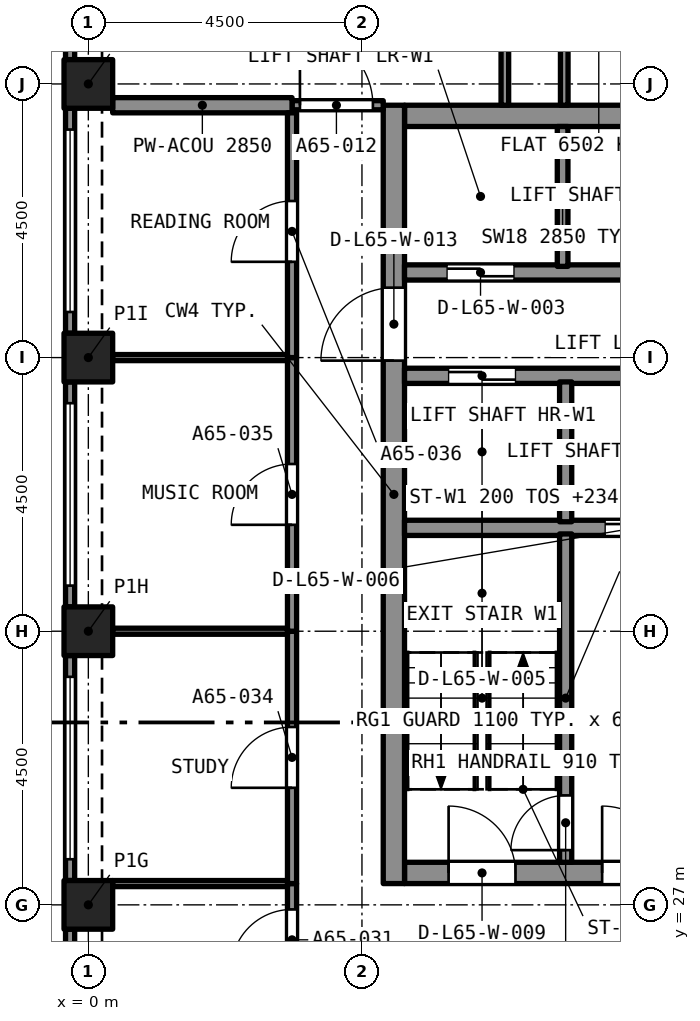
"""IFC4 building model, lengths in metres.
Left out: names, types, materials, properties, quantities, classifications, styles, units other than length and angle.
Written with IfcOpenShell. Run it as: python <this file> out.ifc"""

import sys

from ifc_helpers import new_model, si_unit, direction, frame, frame_2d, origin, origin_2d, place, context, subcontext, project, spatial, rectangle, extrude, element, fill, save


model = new_model("IFC4")
c1 = context("Model", 3, precision=1e-05, world=origin(), true_north=direction((0.0, 1.0)))
c2 = subcontext(c1, "Body", "Model", "MODEL_VIEW")
j1 = project(units=[si_unit("LENGTHUNIT", "METRE"), si_unit("PLANEANGLEUNIT", "RADIAN")], contexts=[c1])
p1 = place(None, origin())
s1 = spatial("IfcSite", under=j1, at=p1, CompositionType="ELEMENT")
p2 = place(p1, origin())
s2 = spatial("IfcBuilding", under=s1, at=p2, CompositionType="ELEMENT")
p3 = place(p2, frame((0.0, 0.0, 232.495)))
s3 = spatial("IfcBuildingStorey", under=s2, at=p3, CompositionType="ELEMENT", Elevation=232.495)
for number, where, z_axis, x_axis in (
    (1, (0.0, 27.0, 0.0), (0.0, 0.0, 1.0), (1.0, 0.0, 0.0)),
    (2, (0.0, 31.5, 0.0), (0.0, 0.0, 1.0), (1.0, 0.0, 0.0)),
    (3, (0.0, 36.0, 0.0), (0.0, 0.0, 1.0), (1.0, 0.0, 0.0)),
    (4, (0.0, 40.5, 0.0), (0.0, 0.0, 1.0), (1.0, 0.0, 0.0)),
):
    element("IfcColumn", number, at=place(p3, frame(where, z_axis=z_axis, x_axis=x_axis)), inside=s3, PredefinedType="COLUMN", context=c2, shape_type="SweptSolid", body=[
        extrude(rectangle(XDim=0.8, YDim=0.8, at=origin_2d()), origin(), (0.0, 0.0, 1.0), 3.2),
    ])
p4 = place(p3, frame((5.2, 27.525, 0.0), z_axis=(0.0, 0.0, 1.0), x_axis=(1.0, 0.0, 0.0)))
e5 = element("IfcWall", 5, at=p4, inside=s3, PredefinedType="SOLIDWALL", context=c2, shape_type="SweptSolid", body=[
    extrude(rectangle(XDim=7.6, YDim=0.35, at=frame_2d((3.8, 0.0))), origin(), (0.0, 0.0, 1.0), 3.2),
])
p5 = place(p4, frame((0.725, 0.0, 0.0)))
e6 = element("IfcOpeningElement", 6, at=p5, cuts=e5, PredefinedType="OPENING", context=c2, shape_type="SweptSolid", body=[
    extrude(rectangle(XDim=1.1, YDim=2.1, at=frame_2d((0.55, 1.05))), frame((0.0, 0.185, 0.0), z_axis=(0.0, -1.0, 0.0), x_axis=(1.0, 0.0, 0.0)), (0.0, 0.0, 1.0), 0.37),
])
p6 = place(p4, frame((3.25, 0.0, 0.0)))
e7 = element("IfcOpeningElement", 7, at=p6, cuts=e5, PredefinedType="OPENING", context=c2, shape_type="SweptSolid", body=[
    extrude(rectangle(XDim=1.1, YDim=2.1, at=frame_2d((0.55, 1.05))), frame((0.0, 0.185, 0.0), z_axis=(0.0, -1.0, 0.0), x_axis=(1.0, 0.0, 0.0)), (0.0, 0.0, 1.0), 0.37),
])
p7 = place(p4, frame((5.775, 0.0, 0.0)))
e8 = element("IfcOpeningElement", 8, at=p7, cuts=e5, PredefinedType="OPENING", context=c2, shape_type="SweptSolid", body=[
    extrude(rectangle(XDim=1.1, YDim=2.1, at=frame_2d((0.55, 1.05))), frame((0.0, 0.185, 0.0), z_axis=(0.0, -1.0, 0.0), x_axis=(1.0, 0.0, 0.0)), (0.0, 0.0, 1.0), 0.37),
])
p8 = place(p3, frame((5.2, 39.975, 0.0), z_axis=(0.0, 0.0, 1.0), x_axis=(1.0, 0.0, 0.0)))
e9 = element("IfcWall", 9, at=p8, inside=s3, PredefinedType="SOLIDWALL", context=c2, shape_type="SweptSolid", body=[
    extrude(rectangle(XDim=7.6, YDim=0.35, at=frame_2d((3.8, 0.0))), origin(), (0.0, 0.0, 1.0), 3.2),
])
p9 = place(p3, frame((5.025, 27.35, 0.0), z_axis=(0.0, 0.0, 1.0), x_axis=(0.0, 1.0, 0.0)))
e10 = element("IfcWall", 10, at=p9, inside=s3, PredefinedType="SOLIDWALL", context=c2, shape_type="SweptSolid", body=[
    extrude(rectangle(XDim=12.8, YDim=0.35, at=frame_2d((6.4, 0.0))), origin(), (0.0, 0.0, 1.0), 3.2),
])
p10 = place(p9, frame((8.6, 0.0, 0.0)))
e11 = element("IfcOpeningElement", 11, at=p10, cuts=e10, PredefinedType="OPENING", context=c2, shape_type="SweptSolid", body=[
    extrude(rectangle(XDim=1.2, YDim=2.1, at=frame_2d((0.6, 1.05))), frame((0.0, 0.185, 0.0), z_axis=(0.0, -1.0, 0.0), x_axis=(1.0, 0.0, 0.0)), (0.0, 0.0, 1.0), 0.37),
])
p11 = place(p3, frame((-0.3, 40.9, 0.0), z_axis=(0.0, 0.0, 1.0), x_axis=(0.0, 1.0, 0.0)))
e12 = element("IfcWall", 12, at=p11, inside=s3, PredefinedType="SOLIDWALL", context=c2, shape_type="SweptSolid", body=[
    extrude(rectangle(XDim=3.7, YDim=0.15, at=frame_2d((1.85, 0.0))), origin(), (0.0, 0.0, 1.0), 3.2),
])
p12 = place(p11, frame((0.35, 0.0, 0.45)))
e13 = element("IfcOpeningElement", 13, at=p12, cuts=e12, PredefinedType="OPENING", context=c2, shape_type="SweptSolid", body=[
    extrude(rectangle(XDim=3.0, YDim=1.95, at=frame_2d((1.5, 0.975))), frame((0.0, 0.085, 0.0), z_axis=(0.0, -1.0, 0.0), x_axis=(1.0, 0.0, 0.0)), (0.0, 0.0, 1.0), 0.17),
])
p13 = place(p3, frame((-0.3, 36.4, 0.0), z_axis=(0.0, 0.0, 1.0), x_axis=(0.0, 1.0, 0.0)))
e14 = element("IfcWall", 14, at=p13, inside=s3, PredefinedType="SOLIDWALL", context=c2, shape_type="SweptSolid", body=[
    extrude(rectangle(XDim=3.7, YDim=0.15, at=frame_2d((1.85, 0.0))), origin(), (0.0, 0.0, 1.0), 3.2),
])
p14 = place(p13, frame((0.35, 0.0, 0.45)))
e15 = element("IfcOpeningElement", 15, at=p14, cuts=e14, PredefinedType="OPENING", context=c2, shape_type="SweptSolid", body=[
    extrude(rectangle(XDim=3.0, YDim=1.95, at=frame_2d((1.5, 0.975))), frame((0.0, 0.085, 0.0), z_axis=(0.0, -1.0, 0.0), x_axis=(1.0, 0.0, 0.0)), (0.0, 0.0, 1.0), 0.17),
])
p15 = place(p3, frame((-0.3, 31.9, 0.0), z_axis=(0.0, 0.0, 1.0), x_axis=(0.0, 1.0, 0.0)))
e16 = element("IfcWall", 16, at=p15, inside=s3, PredefinedType="SOLIDWALL", context=c2, shape_type="SweptSolid", body=[
    extrude(rectangle(XDim=3.7, YDim=0.15, at=frame_2d((1.85, 0.0))), origin(), (0.0, 0.0, 1.0), 3.2),
])
p16 = place(p15, frame((0.35, 0.0, 0.45)))
e17 = element("IfcOpeningElement", 17, at=p16, cuts=e16, PredefinedType="OPENING", context=c2, shape_type="SweptSolid", body=[
    extrude(rectangle(XDim=3.0, YDim=1.95, at=frame_2d((1.5, 0.975))), frame((0.0, 0.085, 0.0), z_axis=(0.0, -1.0, 0.0), x_axis=(1.0, 0.0, 0.0)), (0.0, 0.0, 1.0), 0.17),
])
p17 = place(p3, frame((-0.3, 27.4, 0.0), z_axis=(0.0, 0.0, 1.0), x_axis=(0.0, 1.0, 0.0)))
e18 = element("IfcWall", 18, at=p17, inside=s3, PredefinedType="SOLIDWALL", context=c2, shape_type="SweptSolid", body=[
    extrude(rectangle(XDim=3.7, YDim=0.15, at=frame_2d((1.85, 0.0))), origin(), (0.0, 0.0, 1.0), 3.2),
])
p18 = place(p17, frame((0.35, 0.0, 0.45)))
e19 = element("IfcOpeningElement", 19, at=p18, cuts=e18, PredefinedType="OPENING", context=c2, shape_type="SweptSolid", body=[
    extrude(rectangle(XDim=3.0, YDim=1.95, at=frame_2d((1.5, 0.975))), frame((0.0, 0.085, 0.0), z_axis=(0.0, -1.0, 0.0), x_axis=(1.0, 0.0, 0.0)), (0.0, 0.0, 1.0), 0.17),
])
p19 = place(p3, frame((-0.3, 22.9, 0.0), z_axis=(0.0, 0.0, 1.0), x_axis=(0.0, 1.0, 0.0)))
e20 = element("IfcWall", 20, at=p19, inside=s3, PredefinedType="SOLIDWALL", context=c2, shape_type="SweptSolid", body=[
    extrude(rectangle(XDim=3.7, YDim=0.15, at=frame_2d((1.85, 0.0))), origin(), (0.0, 0.0, 1.0), 3.2),
])
p20 = place(p19, frame((0.35, 0.0, 0.45)))
e21 = element("IfcOpeningElement", 21, at=p20, cuts=e20, PredefinedType="OPENING", context=c2, shape_type="SweptSolid", body=[
    extrude(rectangle(XDim=3.0, YDim=1.95, at=frame_2d((1.5, 0.975))), frame((0.0, 0.085, 0.0), z_axis=(0.0, -1.0, 0.0), x_axis=(1.0, 0.0, 0.0)), (0.0, 0.0, 1.0), 0.17),
])
p21 = place(p3, frame((6.85, 43.683, 0.0), z_axis=(0.0, 0.0, 1.0), x_axis=(0.0, -1.0, 0.0)))
e22 = element("IfcWall", 22, at=p21, inside=s3, PredefinedType="PARTITIONING", context=c2, shape_type="SweptSolid", body=[
    extrude(rectangle(XDim=3.533, YDim=0.125, at=frame_2d((1.766, 0.0))), origin(), (0.0, 0.0, 1.0), 2.85),
])
p22 = place(p21, frame((0.183, 0.0, 0.0)))
e23 = element("IfcOpeningElement", 23, at=p22, cuts=e22, PredefinedType="OPENING", context=c2, shape_type="SweptSolid", body=[
    extrude(rectangle(XDim=0.8, YDim=2.1, at=frame_2d((0.4, 1.05))), frame((0.0, 0.073, 0.0), z_axis=(0.0, -1.0, 0.0), x_axis=(1.0, 0.0, 0.0)), (0.0, 0.0, 1.0), 0.145),
])
p23 = place(p3, frame((7.827, 40.15, 0.0), z_axis=(0.0, 0.0, 1.0), x_axis=(0.0, 1.0, 0.0)))
e24 = element("IfcWall", 24, at=p23, inside=s3, PredefinedType="PARTITIONING", context=c2, shape_type="SweptSolid", body=[
    extrude(rectangle(XDim=3.408, YDim=0.125, at=frame_2d((1.704, 0.0))), origin(), (0.0, 0.0, 1.0), 2.85),
])
p24 = place(p3, frame((3.35, 40.15, 0.0), z_axis=(0.0, 0.0, 1.0), x_axis=(1.0, 0.0, 0.0)))
e25 = element("IfcWall", 25, at=p24, inside=s3, PredefinedType="PARTITIONING", context=c2, shape_type="SweptSolid", body=[
    extrude(rectangle(XDim=1.5, YDim=0.15, at=frame_2d((0.75, 0.0))), origin(), (0.0, 0.0, 1.0), 2.85),
])
p25 = place(p24, frame((0.13, 0.0, 0.0)))
e26 = element("IfcOpeningElement", 26, at=p25, cuts=e25, PredefinedType="OPENING", context=c2, shape_type="SweptSolid", body=[
    extrude(rectangle(XDim=1.2, YDim=2.4, at=frame_2d((0.6, 1.2))), frame((0.0, 0.085, 0.0), z_axis=(0.0, -1.0, 0.0), x_axis=(1.0, 0.0, 0.0)), (0.0, 0.0, 1.0), 0.17),
])
p26 = place(p3, frame((0.4, 40.15, 0.0), z_axis=(0.0, 0.0, 1.0), x_axis=(1.0, 0.0, 0.0)))
e27 = element("IfcWall", 27, at=p26, inside=s3, PredefinedType="PARTITIONING", context=c2, shape_type="SweptSolid", body=[
    extrude(rectangle(XDim=2.95, YDim=0.25, at=frame_2d((1.475, 0.0))), origin(), (0.0, 0.0, 1.0), 2.85),
])
p27 = place(p3, frame((3.35, 25.425, 0.0), z_axis=(0.0, 0.0, 1.0), x_axis=(0.0, 1.0, 0.0)))
e28 = element("IfcWall", 28, at=p27, inside=s3, PredefinedType="PARTITIONING", context=c2, shape_type="SweptSolid", body=[
    extrude(rectangle(XDim=1.925, YDim=0.15, at=frame_2d((0.962, 0.0))), origin(), (0.0, 0.0, 1.0), 2.85),
])
p28 = place(p27, frame((0.5, 0.0, 0.0)))
e29 = element("IfcOpeningElement", 29, at=p28, cuts=e28, PredefinedType="OPENING", context=c2, shape_type="SweptSolid", body=[
    extrude(rectangle(XDim=1.0, YDim=2.1, at=frame_2d((0.5, 1.05))), frame((0.0, 0.085, 0.0), z_axis=(0.0, -1.0, 0.0), x_axis=(1.0, 0.0, 0.0)), (0.0, 0.0, 1.0), 0.17),
])
p29 = place(p3, frame((3.35, 27.35, 0.0), z_axis=(0.0, 0.0, 1.0), x_axis=(0.0, 1.0, 0.0)))
e30 = element("IfcWall", 30, at=p29, inside=s3, PredefinedType="PARTITIONING", context=c2, shape_type="SweptSolid", body=[
    extrude(rectangle(XDim=4.15, YDim=0.15, at=frame_2d((2.075, 0.0))), origin(), (0.0, 0.0, 1.0), 2.85),
])
p30 = place(p29, frame((1.575, 0.0, 0.0)))
e31 = element("IfcOpeningElement", 31, at=p30, cuts=e30, PredefinedType="OPENING", context=c2, shape_type="SweptSolid", body=[
    extrude(rectangle(XDim=1.0, YDim=2.1, at=frame_2d((0.5, 1.05))), frame((0.0, 0.085, 0.0), z_axis=(0.0, -1.0, 0.0), x_axis=(1.0, 0.0, 0.0)), (0.0, 0.0, 1.0), 0.17),
])
p31 = place(p3, frame((3.35, 31.5, 0.0), z_axis=(0.0, 0.0, 1.0), x_axis=(0.0, 1.0, 0.0)))
e32 = element("IfcWall", 32, at=p31, inside=s3, PredefinedType="PARTITIONING", context=c2, shape_type="SweptSolid", body=[
    extrude(rectangle(XDim=4.5, YDim=0.15, at=frame_2d((2.25, 0.0))), origin(), (0.0, 0.0, 1.0), 2.85),
])
p32 = place(p31, frame((1.75, 0.0, 0.0)))
e33 = element("IfcOpeningElement", 33, at=p32, cuts=e32, PredefinedType="OPENING", context=c2, shape_type="SweptSolid", body=[
    extrude(rectangle(XDim=1.0, YDim=2.1, at=frame_2d((0.5, 1.05))), frame((0.0, 0.085, 0.0), z_axis=(0.0, -1.0, 0.0), x_axis=(1.0, 0.0, 0.0)), (0.0, 0.0, 1.0), 0.17),
])
p33 = place(p3, frame((3.35, 36.0, 0.0), z_axis=(0.0, 0.0, 1.0), x_axis=(0.0, 1.0, 0.0)))
e34 = element("IfcWall", 34, at=p33, inside=s3, PredefinedType="PARTITIONING", context=c2, shape_type="SweptSolid", body=[
    extrude(rectangle(XDim=4.025, YDim=0.15, at=frame_2d((2.012, 0.0))), origin(), (0.0, 0.0, 1.0), 2.85),
])
p34 = place(p33, frame((1.575, 0.0, 0.0)))
e35 = element("IfcOpeningElement", 35, at=p34, cuts=e34, PredefinedType="OPENING", context=c2, shape_type="SweptSolid", body=[
    extrude(rectangle(XDim=1.0, YDim=2.1, at=frame_2d((0.5, 1.05))), frame((0.0, 0.085, 0.0), z_axis=(0.0, -1.0, 0.0), x_axis=(1.0, 0.0, 0.0)), (0.0, 0.0, 1.0), 0.17),
])
for number, where, z_axis, x_axis in (
    (36, (0.4, 27.35, 0.0), (0.0, 0.0, 1.0), (1.0, 0.0, 0.0)),
    (37, (0.4, 31.5, 0.0), (0.0, 0.0, 1.0), (1.0, 0.0, 0.0)),
    (38, (0.4, 36.0, 0.0), (0.0, 0.0, 1.0), (1.0, 0.0, 0.0)),
):
    element("IfcWall", number, at=place(p3, frame(where, z_axis=z_axis, x_axis=x_axis)), inside=s3, PredefinedType="PARTITIONING", context=c2, shape_type="SweptSolid", body=[
        extrude(rectangle(XDim=2.875, YDim=0.1, at=frame_2d((1.438, 0.0))), origin(), (0.0, 0.0, 1.0), 2.85),
    ])
p35 = place(p3, frame((5.2, 33.2, 0.0), z_axis=(0.0, 0.0, 1.0), x_axis=(1.0, 0.0, 0.0)))
e39 = element("IfcWall", 39, at=p35, inside=s3, PredefinedType="SOLIDWALL", context=c2, shape_type="SweptSolid", body=[
    extrude(rectangle(XDim=7.6, YDim=0.25, at=frame_2d((3.8, 0.0))), origin(), (0.0, 0.0, 1.0), 2.85),
])
p36 = place(p35, frame((3.3, 0.0, 0.0)))
e40 = element("IfcOpeningElement", 40, at=p36, cuts=e39, PredefinedType="OPENING", context=c2, shape_type="SweptSolid", body=[
    extrude(rectangle(XDim=1.0, YDim=2.1, at=frame_2d((0.5, 1.05))), frame((0.0, 0.135, 0.0), z_axis=(0.0, -1.0, 0.0), x_axis=(1.0, 0.0, 0.0)), (0.0, 0.0, 1.0), 0.27),
])
p37 = place(p3, frame((5.2, 35.7, 0.0), z_axis=(0.0, 0.0, 1.0), x_axis=(1.0, 0.0, 0.0)))
e41 = element("IfcWall", 41, at=p37, inside=s3, PredefinedType="SOLIDWALL", context=c2, shape_type="SweptSolid", body=[
    extrude(rectangle(XDim=7.6, YDim=0.25, at=frame_2d((3.8, 0.0))), origin(), (0.0, 0.0, 1.0), 2.85),
])
p38 = place(p37, frame((0.725, 0.0, 0.0)))
e42 = element("IfcOpeningElement", 42, at=p38, cuts=e41, PredefinedType="OPENING", context=c2, shape_type="SweptSolid", body=[
    extrude(rectangle(XDim=1.1, YDim=2.4, at=frame_2d((0.55, 1.2))), frame((0.0, 0.135, 0.0), z_axis=(0.0, -1.0, 0.0), x_axis=(1.0, 0.0, 0.0)), (0.0, 0.0, 1.0), 0.27),
])
p39 = place(p37, frame((5.125, 0.0, 0.0)))
e43 = element("IfcOpeningElement", 43, at=p39, cuts=e41, PredefinedType="OPENING", context=c2, shape_type="SweptSolid", body=[
    extrude(rectangle(XDim=0.8, YDim=2.1, at=frame_2d((0.4, 1.05))), frame((0.0, 0.135, 0.0), z_axis=(0.0, -1.0, 0.0), x_axis=(1.0, 0.0, 0.0)), (0.0, 0.0, 1.0), 0.27),
])
p40 = place(p37, frame((6.45, 0.0, 0.0)))
e44 = element("IfcOpeningElement", 44, at=p40, cuts=e41, PredefinedType="OPENING", context=c2, shape_type="SweptSolid", body=[
    extrude(rectangle(XDim=0.9, YDim=2.1, at=frame_2d((0.45, 1.05))), frame((0.0, 0.135, 0.0), z_axis=(0.0, -1.0, 0.0), x_axis=(1.0, 0.0, 0.0)), (0.0, 0.0, 1.0), 0.27),
])
p41 = place(p3, frame((5.2, 37.4, 0.0), z_axis=(0.0, 0.0, 1.0), x_axis=(1.0, 0.0, 0.0)))
e45 = element("IfcWall", 45, at=p41, inside=s3, PredefinedType="SOLIDWALL", context=c2, shape_type="SweptSolid", body=[
    extrude(rectangle(XDim=7.6, YDim=0.25, at=frame_2d((3.8, 0.0))), origin(), (0.0, 0.0, 1.0), 2.85),
])
p42 = place(p41, frame((0.7, 0.0, 0.0)))
e46 = element("IfcOpeningElement", 46, at=p42, cuts=e45, PredefinedType="OPENING", context=c2, shape_type="SweptSolid", body=[
    extrude(rectangle(XDim=1.1, YDim=2.4, at=frame_2d((0.55, 1.2))), frame((0.0, 0.135, 0.0), z_axis=(0.0, -1.0, 0.0), x_axis=(1.0, 0.0, 0.0)), (0.0, 0.0, 1.0), 0.27),
])
p43 = place(p3, frame((7.85, 27.7, 0.0), z_axis=(0.0, 0.0, 1.0), x_axis=(0.0, 1.0, 0.0)))
e47 = element("IfcWall", 47, at=p43, inside=s3, PredefinedType="SOLIDWALL", context=c2, shape_type="SweptSolid", body=[
    extrude(rectangle(XDim=5.4, YDim=0.2, at=frame_2d((2.7, 0.0))), origin(), (0.0, 0.0, 1.0), 2.85),
])
p44 = place(p43, frame((0.2, 0.0, 0.0)))
e48 = element("IfcOpeningElement", 48, at=p44, cuts=e47, PredefinedType="OPENING", context=c2, shape_type="SweptSolid", body=[
    extrude(rectangle(XDim=0.9, YDim=2.1, at=frame_2d((0.45, 1.05))), frame((0.0, 0.11, 0.0), z_axis=(0.0, -1.0, 0.0), x_axis=(1.0, 0.0, 0.0)), (0.0, 0.0, 1.0), 0.22),
])
p45 = place(p3, frame((7.85, 33.3, 0.0), z_axis=(0.0, 0.0, 1.0), x_axis=(0.0, 1.0, 0.0)))
e49 = element("IfcWall", 49, at=p45, inside=s3, PredefinedType="SOLIDWALL", context=c2, shape_type="SweptSolid", body=[
    extrude(rectangle(XDim=2.3, YDim=0.2, at=frame_2d((1.15, 0.0))), origin(), (0.0, 0.0, 1.0), 2.85),
])
p46 = place(p3, frame((7.8, 37.5, 0.0), z_axis=(0.0, 0.0, 1.0), x_axis=(0.0, 1.0, 0.0)))
e50 = element("IfcWall", 50, at=p46, inside=s3, PredefinedType="SOLIDWALL", context=c2, shape_type="SweptSolid", body=[
    extrude(rectangle(XDim=2.3, YDim=0.175, at=frame_2d((1.15, 0.0))), origin(), (0.0, 0.0, 1.0), 2.85),
])
p47 = place(p14, origin())
e51 = element("IfcWindow", 51, at=p47, inside=s3, PartitioningType="SINGLE_PANEL", PredefinedType="WINDOW", context=c2, shape_type="SweptSolid", body=[
    extrude(rectangle(XDim=3.0, YDim=1.95, at=frame_2d((1.5, 0.975))), frame((0.0, 0.03, 0.0), z_axis=(0.0, -1.0, 0.0), x_axis=(1.0, 0.0, 0.0)), (0.0, 0.0, 1.0), 0.06),
])
fill(e15, e51)
p48 = place(p16, origin())
e52 = element("IfcWindow", 52, at=p48, inside=s3, PartitioningType="SINGLE_PANEL", PredefinedType="WINDOW", context=c2, shape_type="SweptSolid", body=[
    extrude(rectangle(XDim=3.0, YDim=1.95, at=frame_2d((1.5, 0.975))), frame((0.0, 0.03, 0.0), z_axis=(0.0, -1.0, 0.0), x_axis=(1.0, 0.0, 0.0)), (0.0, 0.0, 1.0), 0.06),
])
fill(e17, e52)
p49 = place(p18, origin())
e53 = element("IfcWindow", 53, at=p49, inside=s3, PartitioningType="SINGLE_PANEL", PredefinedType="WINDOW", context=c2, shape_type="SweptSolid", body=[
    extrude(rectangle(XDim=3.0, YDim=1.95, at=frame_2d((1.5, 0.975))), frame((0.0, 0.03, 0.0), z_axis=(0.0, -1.0, 0.0), x_axis=(1.0, 0.0, 0.0)), (0.0, 0.0, 1.0), 0.06),
])
fill(e19, e53)
p50 = place(p25, origin())
e54 = element("IfcDoor", 54, at=p50, inside=s3, OperationType="SINGLE_SWING_LEFT", PredefinedType="DOOR", context=c2, shape_type="SweptSolid", body=[
    extrude(rectangle(XDim=1.2, YDim=2.4, at=frame_2d((0.6, 1.2))), frame((0.0, 0.025, 0.0), z_axis=(0.0, -1.0, 0.0), x_axis=(1.0, 0.0, 0.0)), (0.0, 0.0, 1.0), 0.05),
])
fill(e26, e54)
p51 = place(p28, origin())
e55 = element("IfcDoor", 55, at=p51, inside=s3, OperationType="SINGLE_SWING_RIGHT", PredefinedType="DOOR", context=c2, shape_type="SweptSolid", body=[
    extrude(rectangle(XDim=1.0, YDim=2.1, at=frame_2d((0.5, 1.05))), frame((0.0, 0.025, 0.0), z_axis=(0.0, -1.0, 0.0), x_axis=(1.0, 0.0, 0.0)), (0.0, 0.0, 1.0), 0.05),
])
fill(e29, e55)
p52 = place(p30, origin())
e56 = element("IfcDoor", 56, at=p52, inside=s3, OperationType="SINGLE_SWING_RIGHT", PredefinedType="DOOR", context=c2, shape_type="SweptSolid", body=[
    extrude(rectangle(XDim=1.0, YDim=2.1, at=frame_2d((0.5, 1.05))), frame((0.0, 0.025, 0.0), z_axis=(0.0, -1.0, 0.0), x_axis=(1.0, 0.0, 0.0)), (0.0, 0.0, 1.0), 0.05),
])
fill(e31, e56)
p53 = place(p32, origin())
e57 = element("IfcDoor", 57, at=p53, inside=s3, OperationType="SINGLE_SWING_RIGHT", PredefinedType="DOOR", context=c2, shape_type="SweptSolid", body=[
    extrude(rectangle(XDim=1.0, YDim=2.1, at=frame_2d((0.5, 1.05))), frame((0.0, 0.025, 0.0), z_axis=(0.0, -1.0, 0.0), x_axis=(1.0, 0.0, 0.0)), (0.0, 0.0, 1.0), 0.05),
])
fill(e33, e57)
p54 = place(p34, origin())
e58 = element("IfcDoor", 58, at=p54, inside=s3, OperationType="SINGLE_SWING_RIGHT", PredefinedType="DOOR", context=c2, shape_type="SweptSolid", body=[
    extrude(rectangle(XDim=1.0, YDim=2.1, at=frame_2d((0.5, 1.05))), frame((0.0, 0.025, 0.0), z_axis=(0.0, -1.0, 0.0), x_axis=(1.0, 0.0, 0.0)), (0.0, 0.0, 1.0), 0.05),
])
fill(e35, e58)
p55 = place(p44, origin())
e59 = element("IfcDoor", 59, at=p55, inside=s3, OperationType="SINGLE_SWING_LEFT", PredefinedType="DOOR", context=c2, shape_type="SweptSolid", body=[
    extrude(rectangle(XDim=0.9, YDim=2.1, at=frame_2d((0.45, 1.05))), frame((0.0, 0.025, 0.0), z_axis=(0.0, -1.0, 0.0), x_axis=(1.0, 0.0, 0.0)), (0.0, 0.0, 1.0), 0.05),
])
fill(e48, e59)
p56 = place(p42, origin())
e60 = element("IfcDoor", 60, at=p56, inside=s3, OperationType="SLIDING_TO_LEFT", PredefinedType="DOOR", context=c2, shape_type="SweptSolid", body=[
    extrude(rectangle(XDim=1.1, YDim=2.4, at=frame_2d((0.55, 1.2))), frame((0.0, 0.025, 0.0), z_axis=(0.0, -1.0, 0.0), x_axis=(1.0, 0.0, 0.0)), (0.0, 0.0, 1.0), 0.05),
])
fill(e46, e60)
p57 = place(p38, origin())
e61 = element("IfcDoor", 61, at=p57, inside=s3, OperationType="SLIDING_TO_LEFT", PredefinedType="DOOR", context=c2, shape_type="SweptSolid", body=[
    extrude(rectangle(XDim=1.1, YDim=2.4, at=frame_2d((0.55, 1.2))), frame((0.0, 0.025, 0.0), z_axis=(0.0, -1.0, 0.0), x_axis=(1.0, 0.0, 0.0)), (0.0, 0.0, 1.0), 0.05),
])
fill(e42, e61)
p58 = place(p36, origin())
e62 = element("IfcDoor", 62, at=p58, inside=s3, OperationType="SLIDING_TO_LEFT", PredefinedType="DOOR", context=c2, shape_type="SweptSolid", body=[
    extrude(rectangle(XDim=1.0, YDim=2.1, at=frame_2d((0.5, 1.05))), frame((0.0, 0.025, 0.0), z_axis=(0.0, -1.0, 0.0), x_axis=(1.0, 0.0, 0.0)), (0.0, 0.0, 1.0), 0.05),
])
fill(e40, e62)
p59 = place(p5, origin())
e63 = element("IfcDoor", 63, at=p59, inside=s3, OperationType="SINGLE_SWING_LEFT", PredefinedType="DOOR", context=c2, shape_type="SweptSolid", body=[
    extrude(rectangle(XDim=1.1, YDim=2.1, at=frame_2d((0.55, 1.05))), frame((0.0, 0.025, 0.0), z_axis=(0.0, -1.0, 0.0), x_axis=(1.0, 0.0, 0.0)), (0.0, 0.0, 1.0), 0.05),
])
fill(e6, e63)
p60 = place(p6, origin())
e64 = element("IfcDoor", 64, at=p60, inside=s3, OperationType="SINGLE_SWING_LEFT", PredefinedType="DOOR", context=c2, shape_type="SweptSolid", body=[
    extrude(rectangle(XDim=1.1, YDim=2.1, at=frame_2d((0.55, 1.05))), frame((0.0, 0.025, 0.0), z_axis=(0.0, -1.0, 0.0), x_axis=(1.0, 0.0, 0.0)), (0.0, 0.0, 1.0), 0.05),
])
fill(e7, e64)
p61 = place(p10, origin())
e65 = element("IfcDoor", 65, at=p61, inside=s3, OperationType="SINGLE_SWING_LEFT", PredefinedType="DOOR", context=c2, shape_type="SweptSolid", body=[
    extrude(rectangle(XDim=1.2, YDim=2.1, at=frame_2d((0.6, 1.05))), frame((0.0, 0.025, 0.0), z_axis=(0.0, -1.0, 0.0), x_axis=(1.0, 0.0, 0.0)), (0.0, 0.0, 1.0), 0.05),
])
fill(e11, e65)
save(model, sys.argv[1])
